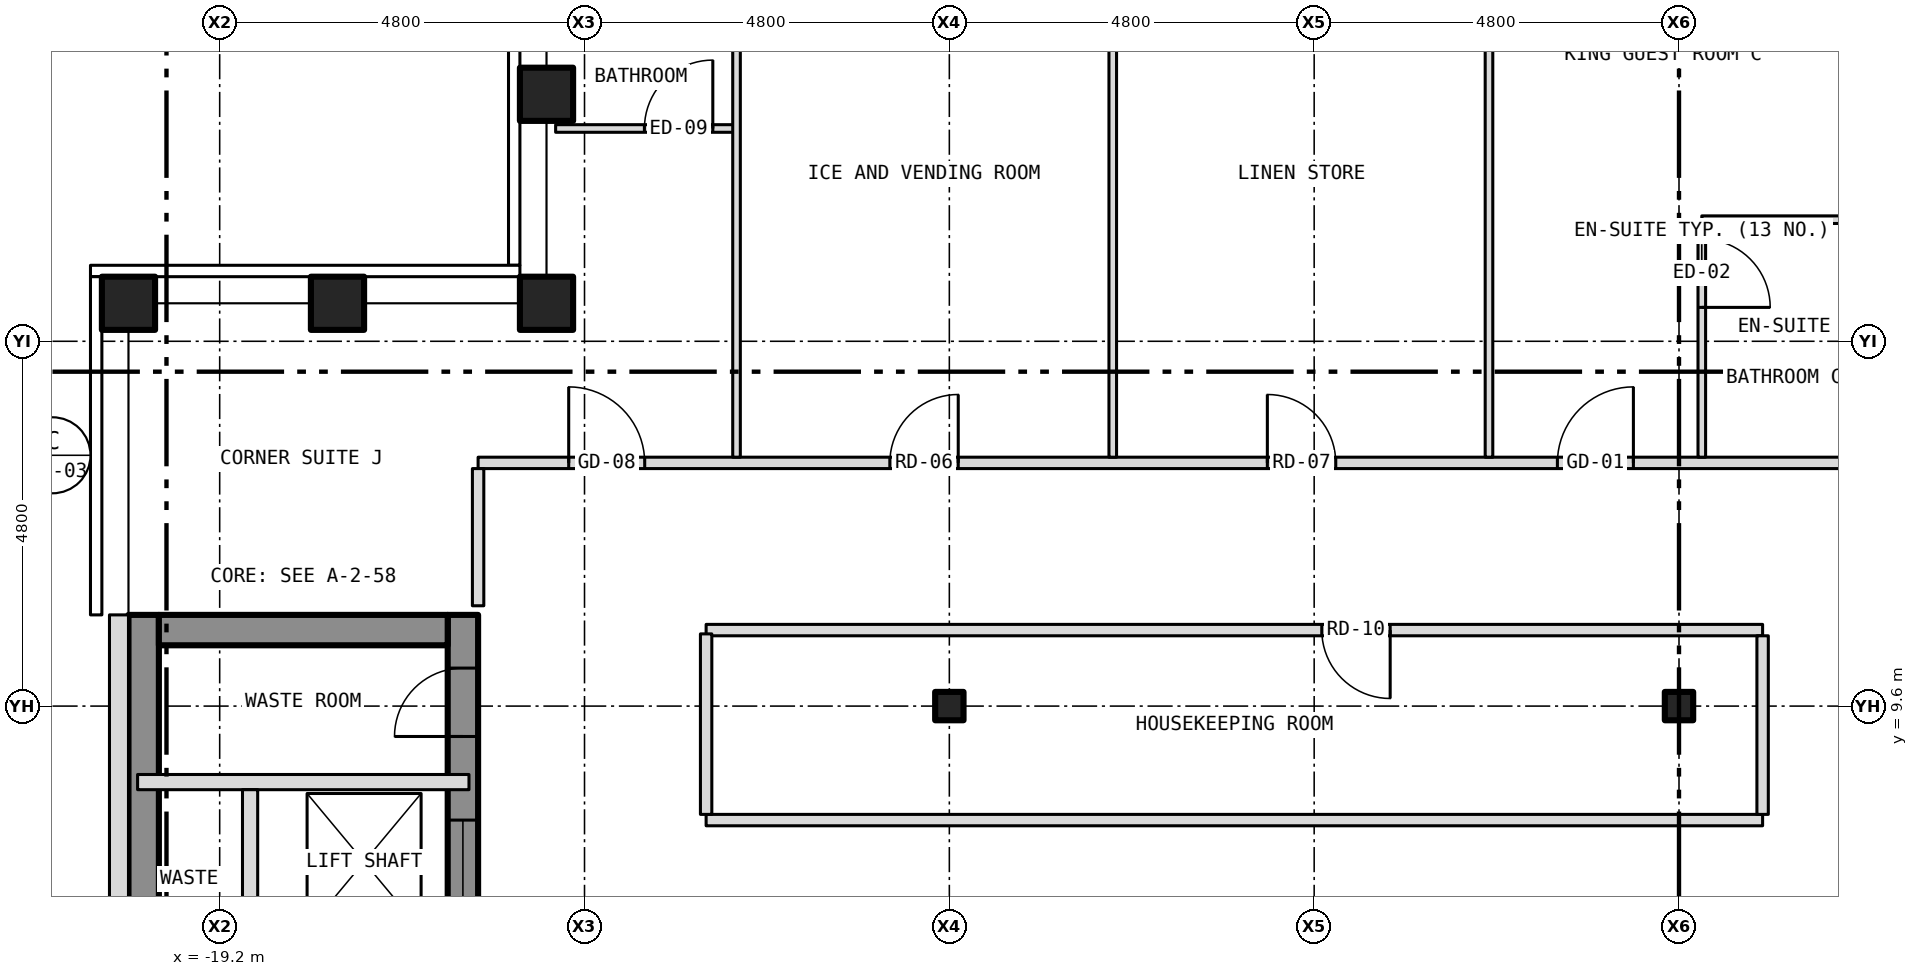
"""IFC4 building model, lengths in metres.
Left out: names, types, materials, properties, quantities, classifications, styles, units other than length and angle.
Written with IfcOpenShell. Run it as: python <this file> out.ifc"""

import sys

from ifc_helpers import new_model, si_unit, direction, frame, frame_2d, origin, origin_2d, place, context, subcontext, project, spatial, rectangle, hollow_rectangle, i_section, extrude, element, fill, save


model = new_model("IFC4")
c1 = context("Model", 3, precision=1e-05, world=origin(), true_north=direction((0.0, 1.0)))
c2 = subcontext(c1, "Body", "Model", "MODEL_VIEW")
j1 = project(units=[si_unit("LENGTHUNIT", "METRE"), si_unit("PLANEANGLEUNIT", "RADIAN")], contexts=[c1])
p1 = place(None, origin())
s1 = spatial("IfcSite", under=j1, at=p1, CompositionType="ELEMENT")
p2 = place(p1, origin())
s2 = spatial("IfcBuilding", under=s1, at=p2, CompositionType="ELEMENT")
p3 = place(p2, frame((0.0, 0.0, 212.0)))
s3 = spatial("IfcBuildingStorey", under=s2, at=p3, CompositionType="ELEMENT", Elevation=212.0)
for number, where, z_axis, x_axis in (
    (1, (-20.4, 14.9, -0.15), (0.0, 0.0, 1.0), (1.0, 0.0, 0.0)),
    (2, (-14.9, 14.9, -0.15), (0.0, 0.0, 1.0), (1.0, 0.0, 0.0)),
    (3, (-14.9, 17.65, -0.15), (0.0, 0.0, 1.0), (1.0, 0.0, 0.0)),
    (4, (-17.65, 14.9, -0.15), (0.0, 0.0, 1.0), (1.0, 0.0, 0.0)),
):
    element("IfcColumn", number, at=place(p3, frame(where, z_axis=z_axis, x_axis=x_axis)), inside=s3, PredefinedType="COLUMN", context=c2, shape_type="SweptSolid", body=[
        extrude(hollow_rectangle(XDim=0.7, YDim=0.7, WallThickness=0.04, at=origin_2d()), origin(), (0.0, 0.0, 1.0), 3.5),
    ])
for number, where, z_axis, x_axis in (
    (5, (-9.6, 9.6, -0.15), (0.0, 0.0, 1.0), (1.0, 0.0, 0.0)),
    (6, (0.0, 9.6, -0.15), (0.0, 0.0, 1.0), (1.0, 0.0, 0.0)),
):
    element("IfcColumn", number, at=place(p3, frame(where, z_axis=z_axis, x_axis=x_axis)), inside=s3, PredefinedType="COLUMN", context=c2, shape_type="SweptSolid", body=[
        extrude(i_section(OverallWidth=0.373, OverallDepth=0.373, WebThickness=0.016, FlangeThickness=0.026, at=origin_2d()), origin(), (0.0, 0.0, 1.0), 3.5),
    ])
p4 = place(p3, frame((-16.0, -10.8, 0.0), z_axis=(0.0, 0.0, 1.0), x_axis=(0.0, 1.0, 0.0)))
e7 = element("IfcWall", 7, at=p4, inside=s3, PredefinedType="SHEAR", context=c2, shape_type="SweptSolid", body=[
    extrude(rectangle(XDim=21.6, YDim=0.4, at=frame_2d((10.8, 0.0))), origin(), (0.0, 0.0, 1.0), 3.25),
])
p5 = place(p4, frame((9.4, 0.0, 0.0)))
e8 = element("IfcOpeningElement", 8, at=p5, cuts=e7, PredefinedType="OPENING", context=c2, shape_type="SweptSolid", body=[
    extrude(rectangle(XDim=1.1, YDim=2.1, at=frame_2d((0.55, 1.05))), frame((0.0, 0.212, 0.0), z_axis=(0.0, -1.0, 0.0), x_axis=(1.0, 0.0, 0.0)), (0.0, 0.0, 1.0), 0.424),
])
p6 = place(p4, frame((11.5, 0.0, 0.0)))
e9 = element("IfcOpeningElement", 9, at=p6, cuts=e7, PredefinedType="OPENING", context=c2, shape_type="SweptSolid", body=[
    extrude(rectangle(XDim=1.1, YDim=2.1, at=frame_2d((0.55, 1.05))), frame((0.0, 0.212, 0.0), z_axis=(0.0, -1.0, 0.0), x_axis=(1.0, 0.0, 0.0)), (0.0, 0.0, 1.0), 0.424),
])
p7 = place(p4, frame((13.6, 0.0, 0.0)))
e10 = element("IfcOpeningElement", 10, at=p7, cuts=e7, PredefinedType="OPENING", context=c2, shape_type="SweptSolid", body=[
    extrude(rectangle(XDim=1.1, YDim=2.1, at=frame_2d((0.55, 1.05))), frame((0.0, 0.212, 0.0), z_axis=(0.0, -1.0, 0.0), x_axis=(1.0, 0.0, 0.0)), (0.0, 0.0, 1.0), 0.424),
])
p8 = place(p4, frame((15.7, 0.0, 0.0)))
e11 = element("IfcOpeningElement", 11, at=p8, cuts=e7, PredefinedType="OPENING", context=c2, shape_type="SweptSolid", body=[
    extrude(rectangle(XDim=1.1, YDim=2.1, at=frame_2d((0.55, 1.05))), frame((0.0, 0.212, 0.0), z_axis=(0.0, -1.0, 0.0), x_axis=(1.0, 0.0, 0.0)), (0.0, 0.0, 1.0), 0.424),
])
p9 = place(p4, frame((17.8, 0.0, 0.0)))
e12 = element("IfcOpeningElement", 12, at=p9, cuts=e7, PredefinedType="OPENING", context=c2, shape_type="SweptSolid", body=[
    extrude(rectangle(XDim=1.1, YDim=2.1, at=frame_2d((0.55, 1.05))), frame((0.0, 0.212, 0.0), z_axis=(0.0, -1.0, 0.0), x_axis=(1.0, 0.0, 0.0)), (0.0, 0.0, 1.0), 0.424),
])
p10 = place(p4, frame((0.458, 0.0, 0.0)))
e13 = element("IfcOpeningElement", 13, at=p10, cuts=e7, PredefinedType="OPENING", context=c2, shape_type="SweptSolid", body=[
    extrude(rectangle(XDim=1.1, YDim=2.1, at=frame_2d((0.55, 1.05))), frame((0.0, 0.212, 0.0), z_axis=(0.0, -1.0, 0.0), x_axis=(1.0, 0.0, 0.0)), (0.0, 0.0, 1.0), 0.424),
])
p11 = place(p4, frame((7.5, 0.0, 0.0)))
e14 = element("IfcOpeningElement", 14, at=p11, cuts=e7, PredefinedType="OPENING", context=c2, shape_type="SweptSolid", body=[
    extrude(rectangle(XDim=1.1, YDim=2.1, at=frame_2d((0.55, 1.05))), frame((0.0, 0.212, 0.0), z_axis=(0.0, -1.0, 0.0), x_axis=(1.0, 0.0, 0.0)), (0.0, 0.0, 1.0), 0.424),
])
p12 = place(p4, frame((20.0, 0.0, 0.0)))
e15 = element("IfcOpeningElement", 15, at=p12, cuts=e7, PredefinedType="OPENING", context=c2, shape_type="SweptSolid", body=[
    extrude(rectangle(XDim=0.9, YDim=2.1, at=frame_2d((0.45, 1.05))), frame((0.0, 0.212, 0.0), z_axis=(0.0, -1.0, 0.0), x_axis=(1.0, 0.0, 0.0)), (0.0, 0.0, 1.0), 0.424),
])
p13 = place(p3, frame((-20.2, -10.8, 0.0), z_axis=(0.0, 0.0, 1.0), x_axis=(0.0, 1.0, 0.0)))
e16 = element("IfcWall", 16, at=p13, inside=s3, PredefinedType="SHEAR", context=c2, shape_type="SweptSolid", body=[
    extrude(rectangle(XDim=21.6, YDim=0.4, at=frame_2d((10.8, 0.0))), origin(), (0.0, 0.0, 1.0), 3.25),
])
p14 = place(p3, frame((-20.0, 10.6, 0.0), z_axis=(0.0, 0.0, 1.0), x_axis=(1.0, 0.0, 0.0)))
e17 = element("IfcWall", 17, at=p14, inside=s3, PredefinedType="SHEAR", context=c2, shape_type="SweptSolid", body=[
    extrude(rectangle(XDim=3.8, YDim=0.4, at=frame_2d((1.9, 0.0))), origin(), (0.0, 0.0, 1.0), 3.25),
])
p15 = place(p3, frame((-20.525, 10.8, 0.0), z_axis=(0.0, 0.0, 1.0), x_axis=(0.0, -1.0, 0.0)))
e18 = element("IfcWall", 18, at=p15, inside=s3, PredefinedType="SOLIDWALL", context=c2, shape_type="SweptSolid", body=[
    extrude(rectangle(XDim=21.6, YDim=0.25, at=frame_2d((10.8, 0.0))), origin(), (0.0, 0.0, 1.0), 3.5),
])
p16 = place(p15, frame((18.05, 0.0, 1.0)))
e19 = element("IfcOpeningElement", 19, at=p16, cuts=e18, PredefinedType="OPENING", context=c2, shape_type="SweptSolid", body=[
    extrude(rectangle(XDim=0.6, YDim=1.5, at=frame_2d((0.3, 0.75))), frame((0.0, 0.137, 0.0), z_axis=(0.0, -1.0, 0.0), x_axis=(1.0, 0.0, 0.0)), (0.0, 0.0, 1.0), 0.274),
])
p17 = place(p3, frame((-12.8, 8.1, 0.0), z_axis=(0.0, 0.0, 1.0), x_axis=(1.0, 0.0, 0.0)))
e20 = element("IfcWall", 20, at=p17, inside=s3, PredefinedType="PARTITIONING", context=c2, shape_type="SweptSolid", body=[
    extrude(rectangle(XDim=13.9, YDim=0.15, at=frame_2d((6.95, 0.0))), origin(), (0.0, 0.0, 1.0), 3.35),
])
p18 = place(p3, frame((-20.28, 8.6, 0.0), z_axis=(0.0, 0.0, 1.0), x_axis=(1.0, 0.0, 0.0)))
e21 = element("IfcWall", 21, at=p18, inside=s3, PredefinedType="PARTITIONING", context=c2, shape_type="SweptSolid", body=[
    extrude(rectangle(XDim=4.36, YDim=0.2, at=frame_2d((2.18, 0.0))), origin(), (0.0, 0.0, 1.0), 3.25),
])
p19 = place(p3, frame((-12.8, 10.6, 0.0), z_axis=(0.0, 0.0, 1.0), x_axis=(1.0, 0.0, 0.0)))
e22 = element("IfcWall", 22, at=p19, inside=s3, PredefinedType="PARTITIONING", context=c2, shape_type="SweptSolid", body=[
    extrude(rectangle(XDim=13.9, YDim=0.15, at=frame_2d((6.95, 0.0))), origin(), (0.0, 0.0, 1.0), 3.35),
])
p20 = place(p19, frame((8.1, 0.0, 0.0)))
e23 = element("IfcOpeningElement", 23, at=p20, cuts=e22, PredefinedType="OPENING", context=c2, shape_type="SweptSolid", body=[
    extrude(rectangle(XDim=0.9, YDim=2.1, at=frame_2d((0.45, 1.05))), frame((0.0, 0.087, 0.0), z_axis=(0.0, -1.0, 0.0), x_axis=(1.0, 0.0, 0.0)), (0.0, 0.0, 1.0), 0.174),
])
p21 = place(p3, frame((-15.8, 12.8, 0.0), z_axis=(0.0, 0.0, 1.0), x_axis=(1.0, 0.0, 0.0)))
e24 = element("IfcWall", 24, at=p21, inside=s3, PredefinedType="PARTITIONING", context=c2, shape_type="SweptSolid", body=[
    extrude(rectangle(XDim=31.6, YDim=0.15, at=frame_2d((15.8, 0.0))), origin(), (0.0, 0.0, 1.0), 3.35),
])
p22 = place(p21, frame((5.417, 0.0, 0.0)))
e25 = element("IfcOpeningElement", 25, at=p22, cuts=e24, PredefinedType="OPENING", context=c2, shape_type="SweptSolid", body=[
    extrude(rectangle(XDim=0.9, YDim=2.1, at=frame_2d((0.45, 1.05))), frame((0.0, 0.087, 0.0), z_axis=(0.0, -1.0, 0.0), x_axis=(1.0, 0.0, 0.0)), (0.0, 0.0, 1.0), 0.174),
])
p23 = place(p21, frame((10.384, 0.0, 0.0)))
e26 = element("IfcOpeningElement", 26, at=p23, cuts=e24, PredefinedType="OPENING", context=c2, shape_type="SweptSolid", body=[
    extrude(rectangle(XDim=0.9, YDim=2.1, at=frame_2d((0.45, 1.05))), frame((0.0, 0.087, 0.0), z_axis=(0.0, -1.0, 0.0), x_axis=(1.0, 0.0, 0.0)), (0.0, 0.0, 1.0), 0.174),
])
p24 = place(p21, frame((14.2, 0.0, 0.0)))
e27 = element("IfcOpeningElement", 27, at=p24, cuts=e24, PredefinedType="OPENING", context=c2, shape_type="SweptSolid", body=[
    extrude(rectangle(XDim=1.0, YDim=2.1, at=frame_2d((0.5, 1.05))), frame((0.0, 0.087, 0.0), z_axis=(0.0, -1.0, 0.0), x_axis=(1.0, 0.0, 0.0)), (0.0, 0.0, 1.0), 0.174),
])
p25 = place(p21, frame((19.166, 0.0, 0.0)))
e28 = element("IfcOpeningElement", 28, at=p25, cuts=e24, PredefinedType="OPENING", context=c2, shape_type="SweptSolid", body=[
    extrude(rectangle(XDim=1.0, YDim=2.1, at=frame_2d((0.5, 1.05))), frame((0.0, 0.087, 0.0), z_axis=(0.0, -1.0, 0.0), x_axis=(1.0, 0.0, 0.0)), (0.0, 0.0, 1.0), 0.174),
])
p26 = place(p21, frame((24.134, 0.0, 0.0)))
e29 = element("IfcOpeningElement", 29, at=p26, cuts=e24, PredefinedType="OPENING", context=c2, shape_type="SweptSolid", body=[
    extrude(rectangle(XDim=1.0, YDim=2.1, at=frame_2d((0.5, 1.05))), frame((0.0, 0.087, 0.0), z_axis=(0.0, -1.0, 0.0), x_axis=(1.0, 0.0, 0.0)), (0.0, 0.0, 1.0), 0.174),
])
p27 = place(p21, frame((1.192, 0.0, 0.0)))
e30 = element("IfcOpeningElement", 30, at=p27, cuts=e24, PredefinedType="OPENING", context=c2, shape_type="SweptSolid", body=[
    extrude(rectangle(XDim=1.0, YDim=2.1, at=frame_2d((0.5, 1.05))), frame((0.0, 0.087, 0.0), z_axis=(0.0, -1.0, 0.0), x_axis=(1.0, 0.0, 0.0)), (0.0, 0.0, 1.0), 0.174),
])
p28 = place(p21, frame((29.409, 0.0, 0.0)))
e31 = element("IfcOpeningElement", 31, at=p28, cuts=e24, PredefinedType="OPENING", context=c2, shape_type="SweptSolid", body=[
    extrude(rectangle(XDim=1.0, YDim=2.1, at=frame_2d((0.5, 1.05))), frame((0.0, 0.087, 0.0), z_axis=(0.0, -1.0, 0.0), x_axis=(1.0, 0.0, 0.0)), (0.0, 0.0, 1.0), 0.174),
])
p29 = place(p3, frame((0.3, 16.0, 0.0), z_axis=(0.0, 0.0, 1.0), x_axis=(1.0, 0.0, 0.0)))
e32 = element("IfcWall", 32, at=p29, inside=s3, PredefinedType="PARTITIONING", context=c2, shape_type="SweptSolid", body=[
    extrude(rectangle(XDim=2.2, YDim=0.1, at=frame_2d((1.1, 0.0))), origin(), (0.0, 0.0, 1.0), 3.35),
])
p30 = place(p3, frame((-14.78, 17.2, 0.0), z_axis=(0.0, 0.0, 1.0), x_axis=(1.0, 0.0, 0.0)))
e33 = element("IfcWall", 33, at=p30, inside=s3, PredefinedType="PARTITIONING", context=c2, shape_type="SweptSolid", body=[
    extrude(rectangle(XDim=2.38, YDim=0.1, at=frame_2d((1.19, 0.0))), origin(), (0.0, 0.0, 1.0), 3.35),
])
p31 = place(p30, frame((1.168, 0.0, 0.0)))
e34 = element("IfcOpeningElement", 34, at=p31, cuts=e33, PredefinedType="OPENING", context=c2, shape_type="SweptSolid", body=[
    extrude(rectangle(XDim=0.9, YDim=2.1, at=frame_2d((0.45, 1.05))), frame((0.0, 0.062, 0.0), z_axis=(0.0, -1.0, 0.0), x_axis=(1.0, 0.0, 0.0)), (0.0, 0.0, 1.0), 0.124),
])
p32 = place(p3, frame((-18.8, -1.8, 0.0), z_axis=(0.0, 0.0, 1.0), x_axis=(0.0, 1.0, 0.0)))
e35 = element("IfcWall", 35, at=p32, inside=s3, PredefinedType="PARTITIONING", context=c2, shape_type="SweptSolid", body=[
    extrude(rectangle(XDim=10.3, YDim=0.2, at=frame_2d((5.15, 0.0))), origin(), (0.0, 0.0, 1.0), 3.25),
])
p33 = place(p3, frame((-15.8, 10.92, 0.0), z_axis=(0.0, 0.0, 1.0), x_axis=(0.0, 1.0, 0.0)))
e36 = element("IfcWall", 36, at=p33, inside=s3, PredefinedType="PARTITIONING", context=c2, shape_type="SweptSolid", body=[
    extrude(rectangle(XDim=1.805, YDim=0.15, at=frame_2d((0.903, 0.0))), origin(), (0.0, 0.0, 1.0), 3.35),
])
p34 = place(p3, frame((-12.8, 8.175, 0.0), z_axis=(0.0, 0.0, 1.0), x_axis=(0.0, 1.0, 0.0)))
e37 = element("IfcWall", 37, at=p34, inside=s3, PredefinedType="PARTITIONING", context=c2, shape_type="SweptSolid", body=[
    extrude(rectangle(XDim=2.375, YDim=0.15, at=frame_2d((1.188, 0.0))), origin(), (0.0, 0.0, 1.0), 3.35),
])
for number, where, z_axis, x_axis in (
    (38, (-12.4, 12.875, 0.0), (0.0, 0.0, 1.0), (0.0, 1.0, 0.0)),
    (39, (-7.45, 12.875, 0.0), (0.0, 0.0, 1.0), (0.0, 1.0, 0.0)),
    (40, (-2.5, 12.875, 0.0), (0.0, 0.0, 1.0), (0.0, 1.0, 0.0)),
):
    element("IfcWall", number, at=place(p3, frame(where, z_axis=z_axis, x_axis=x_axis)), inside=s3, PredefinedType="PARTITIONING", context=c2, shape_type="SweptSolid", body=[
        extrude(rectangle(XDim=7.905, YDim=0.1, at=frame_2d((3.953, 0.0))), origin(), (0.0, 0.0, 1.0), 3.35),
    ])
p35 = place(p3, frame((0.3, 12.875, 0.0), z_axis=(0.0, 0.0, 1.0), x_axis=(0.0, 1.0, 0.0)))
e41 = element("IfcWall", 41, at=p35, inside=s3, PredefinedType="PARTITIONING", context=c2, shape_type="SweptSolid", body=[
    extrude(rectangle(XDim=3.075, YDim=0.1, at=frame_2d((1.538, 0.0))), origin(), (0.0, 0.0, 1.0), 3.35),
])
p36 = place(p35, frame((1.971, 0.0, 0.0)))
e42 = element("IfcOpeningElement", 42, at=p36, cuts=e41, PredefinedType="OPENING", context=c2, shape_type="SweptSolid", body=[
    extrude(rectangle(XDim=0.9, YDim=2.1, at=frame_2d((0.45, 1.05))), frame((0.0, 0.062, 0.0), z_axis=(0.0, -1.0, 0.0), x_axis=(1.0, 0.0, 0.0)), (0.0, 0.0, 1.0), 0.124),
])
p37 = place(p3, frame((1.1, 8.175, 0.0), z_axis=(0.0, 0.0, 1.0), x_axis=(0.0, 1.0, 0.0)))
e43 = element("IfcWall", 43, at=p37, inside=s3, PredefinedType="PARTITIONING", context=c2, shape_type="SweptSolid", body=[
    extrude(rectangle(XDim=2.35, YDim=0.15, at=frame_2d((1.175, 0.0))), origin(), (0.0, 0.0, 1.0), 3.35),
])
p38 = place(p9, origin())
e44 = element("IfcDoor", 44, at=p38, inside=s3, OperationType="SLIDING_TO_LEFT", PredefinedType="DOOR", context=c2, shape_type="SweptSolid", body=[
    extrude(rectangle(XDim=1.1, YDim=2.1, at=frame_2d((0.55, 1.05))), frame((0.0, 0.025, 0.0), z_axis=(0.0, -1.0, 0.0), x_axis=(1.0, 0.0, 0.0)), (0.0, 0.0, 1.0), 0.05),
])
fill(e12, e44)
p39 = place(p12, origin())
e45 = element("IfcDoor", 45, at=p39, inside=s3, OperationType="SINGLE_SWING_LEFT", PredefinedType="DOOR", context=c2, shape_type="SweptSolid", body=[
    extrude(rectangle(XDim=0.9, YDim=2.1, at=frame_2d((0.45, 1.05))), frame((0.0, 0.025, 0.0), z_axis=(0.0, -1.0, 0.0), x_axis=(1.0, 0.0, 0.0)), (0.0, 0.0, 1.0), 0.05),
])
fill(e15, e45)
p40 = place(p22, origin())
e46 = element("IfcDoor", 46, at=p40, inside=s3, OperationType="SINGLE_SWING_RIGHT", PredefinedType="DOOR", context=c2, shape_type="SweptSolid", body=[
    extrude(rectangle(XDim=0.9, YDim=2.1, at=frame_2d((0.45, 1.05))), frame((0.0, 0.025, 0.0), z_axis=(0.0, -1.0, 0.0), x_axis=(1.0, 0.0, 0.0)), (0.0, 0.0, 1.0), 0.05),
])
fill(e25, e46)
p41 = place(p23, origin())
e47 = element("IfcDoor", 47, at=p41, inside=s3, OperationType="SINGLE_SWING_LEFT", PredefinedType="DOOR", context=c2, shape_type="SweptSolid", body=[
    extrude(rectangle(XDim=0.9, YDim=2.1, at=frame_2d((0.45, 1.05))), frame((0.0, 0.025, 0.0), z_axis=(0.0, -1.0, 0.0), x_axis=(1.0, 0.0, 0.0)), (0.0, 0.0, 1.0), 0.05),
])
fill(e26, e47)
p42 = place(p24, origin())
e48 = element("IfcDoor", 48, at=p42, inside=s3, OperationType="SINGLE_SWING_RIGHT", PredefinedType="DOOR", context=c2, shape_type="SweptSolid", body=[
    extrude(rectangle(XDim=1.0, YDim=2.1, at=frame_2d((0.5, 1.05))), frame((0.0, 0.025, 0.0), z_axis=(0.0, -1.0, 0.0), x_axis=(1.0, 0.0, 0.0)), (0.0, 0.0, 1.0), 0.05),
])
fill(e27, e48)
p43 = place(p36, origin())
e49 = element("IfcDoor", 49, at=p43, inside=s3, OperationType="SINGLE_SWING_LEFT", PredefinedType="DOOR", context=c2, shape_type="SweptSolid", body=[
    extrude(rectangle(XDim=0.9, YDim=2.1, at=frame_2d((0.45, 1.05))), frame((0.0, 0.025, 0.0), z_axis=(0.0, -1.0, 0.0), x_axis=(1.0, 0.0, 0.0)), (0.0, 0.0, 1.0), 0.05),
])
fill(e42, e49)
p44 = place(p31, origin())
e50 = element("IfcDoor", 50, at=p44, inside=s3, OperationType="SINGLE_SWING_RIGHT", PredefinedType="DOOR", context=c2, shape_type="SweptSolid", body=[
    extrude(rectangle(XDim=0.9, YDim=2.1, at=frame_2d((0.45, 1.05))), frame((0.0, 0.025, 0.0), z_axis=(0.0, -1.0, 0.0), x_axis=(1.0, 0.0, 0.0)), (0.0, 0.0, 1.0), 0.05),
])
fill(e34, e50)
p45 = place(p27, origin())
e51 = element("IfcDoor", 51, at=p45, inside=s3, OperationType="SINGLE_SWING_LEFT", PredefinedType="DOOR", context=c2, shape_type="SweptSolid", body=[
    extrude(rectangle(XDim=1.0, YDim=2.1, at=frame_2d((0.5, 1.05))), frame((0.0, 0.025, 0.0), z_axis=(0.0, -1.0, 0.0), x_axis=(1.0, 0.0, 0.0)), (0.0, 0.0, 1.0), 0.05),
])
fill(e30, e51)
p46 = place(p20, origin())
e52 = element("IfcDoor", 52, at=p46, inside=s3, OperationType="SINGLE_SWING_RIGHT", PredefinedType="DOOR", context=c2, shape_type="SweptSolid", body=[
    extrude(rectangle(XDim=0.9, YDim=2.1, at=frame_2d((0.45, 1.05))), frame((0.0, 0.025, 0.0), z_axis=(0.0, -1.0, 0.0), x_axis=(1.0, 0.0, 0.0)), (0.0, 0.0, 1.0), 0.05),
])
fill(e23, e52)
save(model, sys.argv[1])
